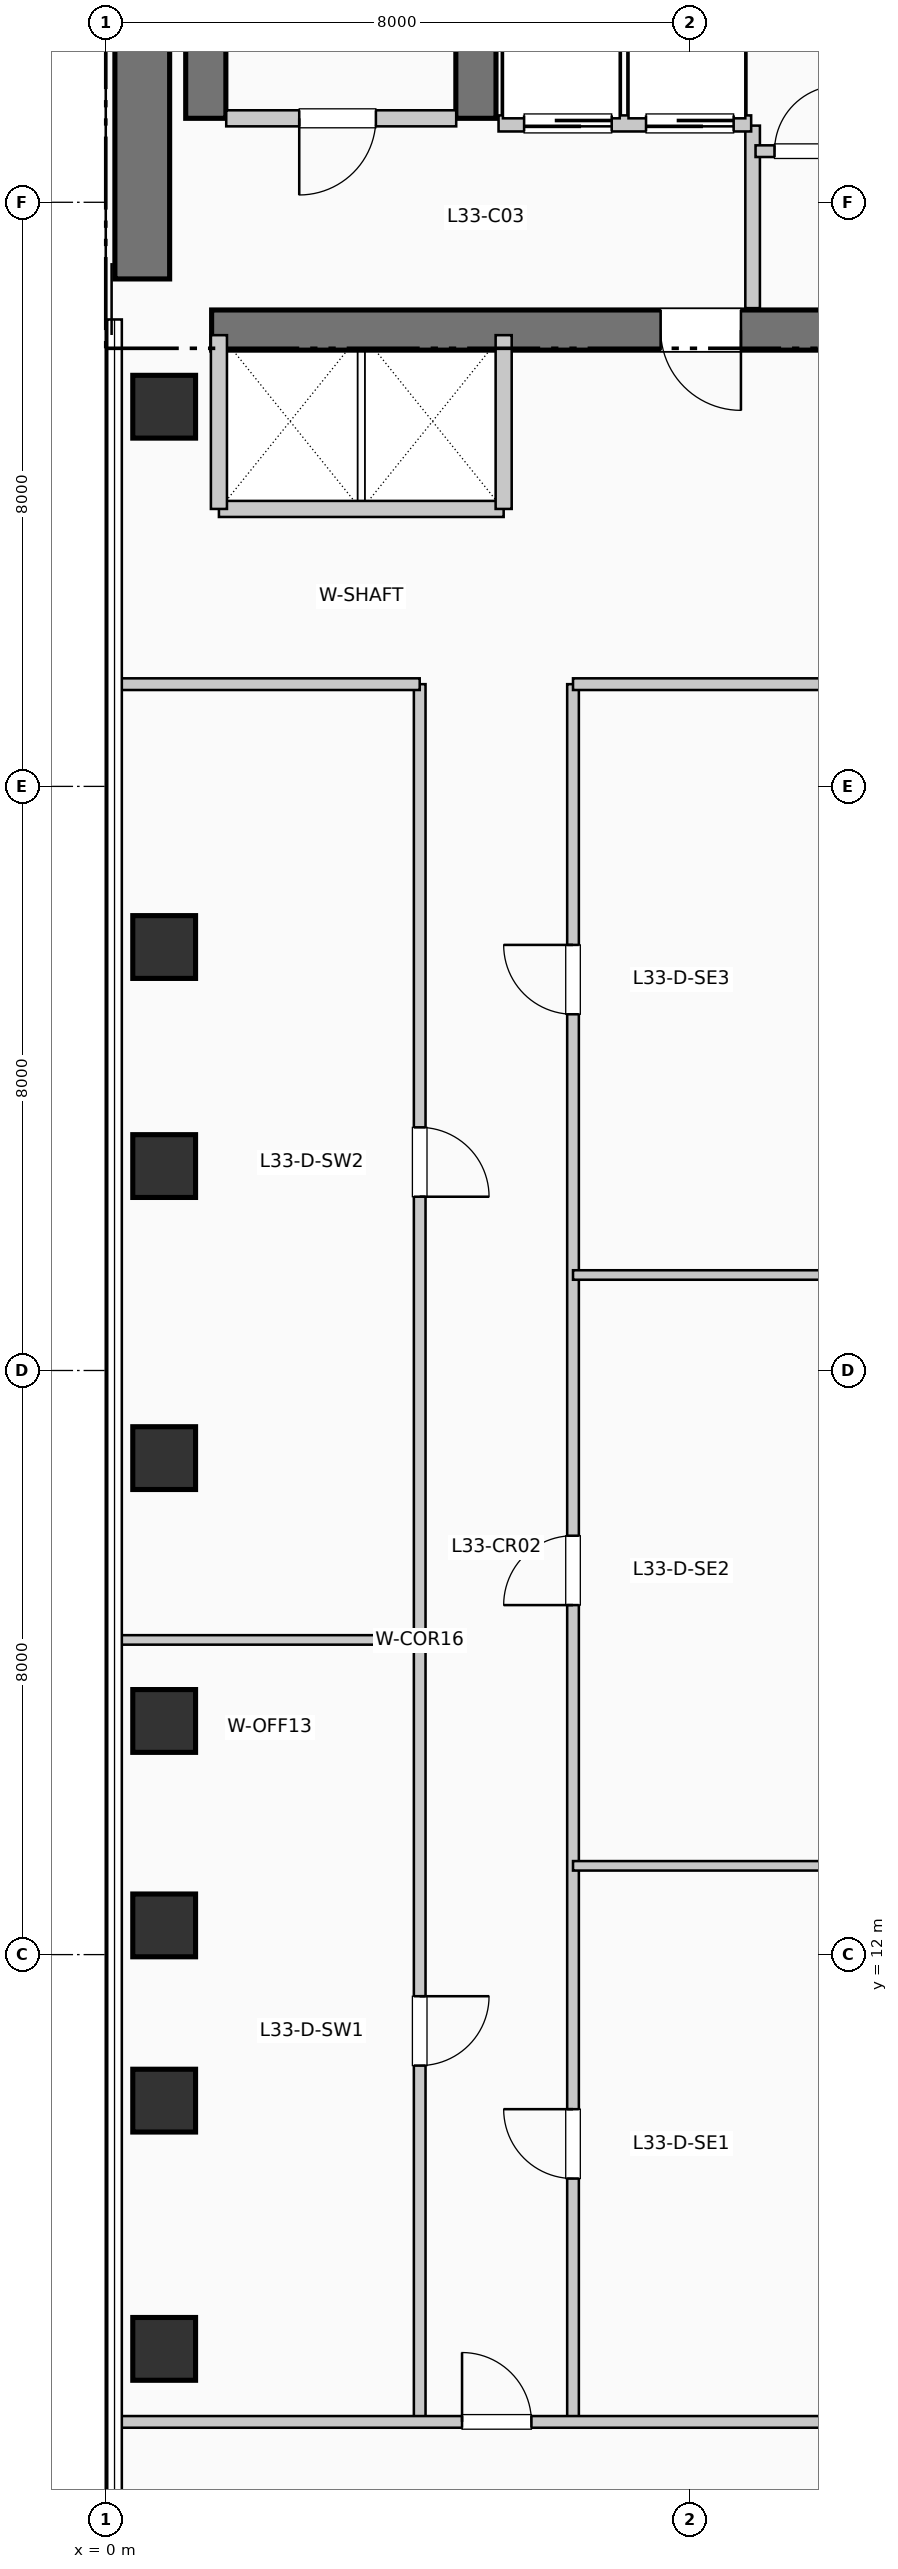
"""IFC4 building model, lengths in metres.
Left out: names, types, materials, properties, quantities, classifications, styles, units other than length and angle.
Written with IfcOpenShell. Run it as: python <this file> out.ifc"""

import sys

from ifc_helpers import new_model, si_unit, direction, frame, frame_2d, origin, origin_2d, place, context, subcontext, project, spatial, rectangle, extrude, element, fill, save


model = new_model("IFC4")
c1 = context("Model", 3, precision=1e-05, world=origin(), true_north=direction((0.0, 1.0)))
c2 = subcontext(c1, "Body", "Model", "MODEL_VIEW")
j1 = project(units=[si_unit("LENGTHUNIT", "METRE"), si_unit("PLANEANGLEUNIT", "RADIAN")], contexts=[c1])
p1 = place(None, origin())
s1 = spatial("IfcSite", under=j1, at=p1, CompositionType="ELEMENT")
p2 = place(p1, origin())
s2 = spatial("IfcBuilding", under=s1, at=p2, CompositionType="ELEMENT")
p3 = place(p2, frame((0.0, 0.0, 138.93)))
s3 = spatial("IfcBuildingStorey", under=s2, at=p3, CompositionType="ELEMENT", Elevation=138.93)
p4 = place(p3, frame((0.5, 34.95, 0.0), z_axis=(0.0, 0.0, 1.0), x_axis=(0.0, 1.0, 0.0)))
e1 = element("IfcWall", 1, at=p4, inside=s3, PredefinedType="SHEAR", context=c2, shape_type="SweptSolid", body=[
    extrude(rectangle(XDim=7.9, YDim=0.75, at=frame_2d((3.95, 0.0))), origin(), (0.0, 0.0, 1.0), 3.96),
])
p5 = place(p3, frame((1.45, 34.25, 0.0), z_axis=(0.0, 0.0, 1.0), x_axis=(1.0, 0.0, 0.0)))
e2 = element("IfcWall", 2, at=p5, inside=s3, PredefinedType="SHEAR", context=c2, shape_type="SweptSolid", body=[
    extrude(rectangle(XDim=10.71, YDim=0.55, at=frame_2d((5.355, 0.0))), origin(), (0.0, 0.0, 1.0), 3.96),
])
p6 = place(p5, frame((7.25, 0.0, 0.0), z_axis=(0.0, 0.0, 1.0), x_axis=(-1.0, 0.0, 0.0)))
e3 = element("IfcOpeningElement", 3, at=p6, cuts=e2, PredefinedType="OPENING", context=c2, shape_type="SweptSolid", body=[
    extrude(rectangle(XDim=1.1, YDim=2.15, at=frame_2d((0.55, 1.075))), frame((0.0, 0.285, 0.0), z_axis=(0.0, -1.0, 0.0), x_axis=(1.0, 0.0, 0.0)), (0.0, 0.0, 1.0), 0.57),
])
for number, where, z_axis, x_axis in (
    (4, (1.37, 37.15, 0.0), (0.0, 0.0, 1.0), (0.0, 1.0, 0.0)),
    (5, (5.07, 37.15, 0.0), (0.0, 0.0, 1.0), (0.0, 1.0, 0.0)),
):
    element("IfcWall", number, at=place(p3, frame(where, z_axis=z_axis, x_axis=x_axis)), inside=s3, PredefinedType="SHEAR", context=c2, shape_type="SweptSolid", body=[
        extrude(rectangle(XDim=7.89, YDim=0.55, at=frame_2d((3.945, 0.0))), origin(), (0.0, 0.0, 1.0), 3.96),
    ])
for number, where, z_axis, x_axis in (
    (6, (0.8, 6.6, 0.0), (0.0, 0.0, 1.0), (1.0, 0.0, 0.0)),
    (7, (0.8, 10.0, 0.0), (0.0, 0.0, 1.0), (1.0, 0.0, 0.0)),
    (8, (0.8, 12.4, 0.0), (0.0, 0.0, 1.0), (1.0, 0.0, 0.0)),
    (9, (0.8, 15.2, 0.0), (0.0, 0.0, 1.0), (1.0, 0.0, 0.0)),
    (10, (0.8, 18.8, 0.0), (0.0, 0.0, 1.0), (1.0, 0.0, 0.0)),
    (11, (0.8, 22.8, 0.0), (0.0, 0.0, 1.0), (1.0, 0.0, 0.0)),
    (12, (0.8, 25.8, 0.0), (0.0, 0.0, 1.0), (1.0, 0.0, 0.0)),
    (13, (0.8, 33.2, 0.0), (0.0, 0.0, 1.0), (1.0, 0.0, 0.0)),
):
    element("IfcColumn", number, at=place(p3, frame(where, z_axis=z_axis, x_axis=x_axis)), inside=s3, PredefinedType="COLUMN", context=c2, shape_type="SweptSolid", body=[
        extrude(rectangle(XDim=0.86, YDim=0.86, at=origin_2d()), origin(), (0.0, 0.0, 1.0), 3.96),
    ])
p7 = place(p3, frame((1.65, 37.15, 0.0), z_axis=(0.0, 0.0, 1.0), x_axis=(1.0, 0.0, 0.0)))
e14 = element("IfcWall", 14, at=p7, inside=s3, PredefinedType="PARTITIONING", context=c2, shape_type="SweptSolid", body=[
    extrude(rectangle(XDim=3.15, YDim=0.22, at=frame_2d((1.575, 0.0))), origin(), (0.0, 0.0, 1.0), 3.71),
])
p8 = place(p7, frame((2.05, 0.0, 0.0), z_axis=(0.0, 0.0, 1.0), x_axis=(-1.0, 0.0, 0.0)))
e15 = element("IfcOpeningElement", 15, at=p8, cuts=e14, PredefinedType="OPENING", context=c2, shape_type="SweptSolid", body=[
    extrude(rectangle(XDim=1.05, YDim=2.15, at=frame_2d((0.525, 1.075))), frame((0.0, 0.12, 0.0), z_axis=(0.0, -1.0, 0.0), x_axis=(1.0, 0.0, 0.0)), (0.0, 0.0, 1.0), 0.24),
])
p9 = place(p3, frame((8.86, 34.55, 0.0), z_axis=(0.0, 0.0, 1.0), x_axis=(0.0, 1.0, 0.0)))
e16 = element("IfcWall", 16, at=p9, inside=s3, PredefinedType="PARTITIONING", context=c2, shape_type="SweptSolid", body=[
    extrude(rectangle(XDim=2.5, YDim=0.2, at=frame_2d((1.25, 0.0))), origin(), (0.0, 0.0, 1.0), 3.71),
])
p10 = place(p3, frame((5.38, 37.08, 0.0), z_axis=(0.0, 0.0, 1.0), x_axis=(1.0, 0.0, 0.0)))
e17 = element("IfcWall", 17, at=p10, inside=s3, PredefinedType="PARTITIONING", context=c2, shape_type="SweptSolid", body=[
    extrude(rectangle(XDim=3.46, YDim=0.22, at=frame_2d((1.73, 0.0))), origin(), (0.0, 0.0, 1.0), 3.71),
])
p11 = place(p10, frame((1.55, 0.0, 0.0), z_axis=(0.0, 0.0, 1.0), x_axis=(-1.0, 0.0, 0.0)))
e18 = element("IfcOpeningElement", 18, at=p11, cuts=e17, PredefinedType="OPENING", context=c2, shape_type="SweptSolid", body=[
    extrude(rectangle(XDim=1.2, YDim=2.2, at=frame_2d((0.6, 1.1))), frame((0.0, 0.12, 0.0), z_axis=(0.0, -1.0, 0.0), x_axis=(1.0, 0.0, 0.0)), (0.0, 0.0, 1.0), 0.24),
])
p12 = place(p10, frame((3.22, 0.0, 0.0), z_axis=(0.0, 0.0, 1.0), x_axis=(-1.0, 0.0, 0.0)))
e19 = element("IfcOpeningElement", 19, at=p12, cuts=e17, PredefinedType="OPENING", context=c2, shape_type="SweptSolid", body=[
    extrude(rectangle(XDim=1.2, YDim=2.2, at=frame_2d((0.6, 1.1))), frame((0.0, 0.12, 0.0), z_axis=(0.0, -1.0, 0.0), x_axis=(1.0, 0.0, 0.0)), (0.0, 0.0, 1.0), 0.24),
])
p13 = place(p3, frame((1.55, 31.8, 0.0), z_axis=(0.0, 0.0, 1.0), x_axis=(1.0, 0.0, 0.0)))
e20 = element("IfcWall", 20, at=p13, inside=s3, PredefinedType="PARTITIONING", context=c2, shape_type="SweptSolid", body=[
    extrude(rectangle(XDim=3.9, YDim=0.22, at=frame_2d((1.95, 0.0))), origin(), (0.0, 0.0, 1.0), 3.71),
])
for number, where, z_axis, x_axis in (
    (21, (1.55, 31.8, 0.0), (0.0, 0.0, 1.0), (0.0, 1.0, 0.0)),
    (22, (5.45, 31.8, 0.0), (0.0, 0.0, 1.0), (0.0, 1.0, 0.0)),
):
    element("IfcWall", number, at=place(p3, frame(where, z_axis=z_axis, x_axis=x_axis)), inside=s3, PredefinedType="PARTITIONING", context=c2, shape_type="SweptSolid", body=[
        extrude(rectangle(XDim=2.38, YDim=0.22, at=frame_2d((1.19, 0.0))), origin(), (0.0, 0.0, 1.0), 3.71),
    ])
p14 = place(p3, frame((8.9, 36.7, 0.0), z_axis=(0.0, 0.0, 1.0), x_axis=(1.0, 0.0, 0.0)))
e23 = element("IfcWall", 23, at=p14, inside=s3, PredefinedType="PARTITIONING", context=c2, shape_type="SweptSolid", body=[
    extrude(rectangle(XDim=3.25, YDim=0.16, at=frame_2d((1.625, 0.0))), origin(), (0.0, 0.0, 1.0), 3.71),
])
p15 = place(p14, frame((0.26, 0.0, 0.0)))
e24 = element("IfcOpeningElement", 24, at=p15, cuts=e23, PredefinedType="OPENING", context=c2, shape_type="SweptSolid", body=[
    extrude(rectangle(XDim=0.9, YDim=2.15, at=frame_2d((0.45, 1.075))), frame((0.0, 0.09, 0.0), z_axis=(0.0, -1.0, 0.0), x_axis=(1.0, 0.0, 0.0)), (0.0, 0.0, 1.0), 0.18),
])
p16 = place(p14, frame((1.68, 0.0, 0.0)))
e25 = element("IfcOpeningElement", 25, at=p16, cuts=e23, PredefinedType="OPENING", context=c2, shape_type="SweptSolid", body=[
    extrude(rectangle(XDim=0.9, YDim=2.15, at=frame_2d((0.45, 1.075))), frame((0.0, 0.09, 0.0), z_axis=(0.0, -1.0, 0.0), x_axis=(1.0, 0.0, 0.0)), (0.0, 0.0, 1.0), 0.18),
])
p17 = place(p3, frame((4.3, 5.6, 0.0), z_axis=(0.0, 0.0, 1.0), x_axis=(0.0, 1.0, 0.0)))
e26 = element("IfcWall", 26, at=p17, inside=s3, PredefinedType="PARTITIONING", context=c2, shape_type="SweptSolid", body=[
    extrude(rectangle(XDim=23.8, YDim=0.16, at=frame_2d((11.9, 0.0))), origin(), (0.0, 0.0, 1.0), 3.71),
])
p18 = place(p17, frame((5.83, 0.0, 0.0), z_axis=(0.0, 0.0, 1.0), x_axis=(-1.0, 0.0, 0.0)))
e27 = element("IfcOpeningElement", 27, at=p18, cuts=e26, PredefinedType="OPENING", context=c2, shape_type="SweptSolid", body=[
    extrude(rectangle(XDim=0.95, YDim=2.15, at=frame_2d((0.475, 1.075))), frame((0.0, 0.09, 0.0), z_axis=(0.0, -1.0, 0.0), x_axis=(1.0, 0.0, 0.0)), (0.0, 0.0, 1.0), 0.18),
])
p19 = place(p17, frame((17.73, 0.0, 0.0), z_axis=(0.0, 0.0, 1.0), x_axis=(-1.0, 0.0, 0.0)))
e28 = element("IfcOpeningElement", 28, at=p19, cuts=e26, PredefinedType="OPENING", context=c2, shape_type="SweptSolid", body=[
    extrude(rectangle(XDim=0.95, YDim=2.15, at=frame_2d((0.475, 1.075))), frame((0.0, 0.09, 0.0), z_axis=(0.0, -1.0, 0.0), x_axis=(1.0, 0.0, 0.0)), (0.0, 0.0, 1.0), 0.18),
])
p20 = place(p3, frame((6.4, 5.6, 0.0), z_axis=(0.0, 0.0, 1.0), x_axis=(0.0, 1.0, 0.0)))
e29 = element("IfcWall", 29, at=p20, inside=s3, PredefinedType="PARTITIONING", context=c2, shape_type="SweptSolid", body=[
    extrude(rectangle(XDim=23.8, YDim=0.16, at=frame_2d((11.9, 0.0))), origin(), (0.0, 0.0, 1.0), 3.71),
])
p21 = place(p20, frame((3.333, 0.0, 0.0)))
e30 = element("IfcOpeningElement", 30, at=p21, cuts=e29, PredefinedType="OPENING", context=c2, shape_type="SweptSolid", body=[
    extrude(rectangle(XDim=0.95, YDim=2.15, at=frame_2d((0.475, 1.075))), frame((0.0, 0.09, 0.0), z_axis=(0.0, -1.0, 0.0), x_axis=(1.0, 0.0, 0.0)), (0.0, 0.0, 1.0), 0.18),
])
p22 = place(p20, frame((11.187, 0.0, 0.0)))
e31 = element("IfcOpeningElement", 31, at=p22, cuts=e29, PredefinedType="OPENING", context=c2, shape_type="SweptSolid", body=[
    extrude(rectangle(XDim=0.95, YDim=2.15, at=frame_2d((0.475, 1.075))), frame((0.0, 0.09, 0.0), z_axis=(0.0, -1.0, 0.0), x_axis=(1.0, 0.0, 0.0)), (0.0, 0.0, 1.0), 0.18),
])
p23 = place(p20, frame((19.279, 0.0, 0.0)))
e32 = element("IfcOpeningElement", 32, at=p23, cuts=e29, PredefinedType="OPENING", context=c2, shape_type="SweptSolid", body=[
    extrude(rectangle(XDim=0.95, YDim=2.15, at=frame_2d((0.475, 1.075))), frame((0.0, 0.09, 0.0), z_axis=(0.0, -1.0, 0.0), x_axis=(1.0, 0.0, 0.0)), (0.0, 0.0, 1.0), 0.18),
])
p24 = place(p3, frame((0.19, 5.6, 0.0), z_axis=(0.0, 0.0, 1.0), x_axis=(1.0, 0.0, 0.0)))
e33 = element("IfcWall", 33, at=p24, inside=s3, PredefinedType="PARTITIONING", context=c2, shape_type="SweptSolid", body=[
    extrude(rectangle(XDim=23.26, YDim=0.16, at=frame_2d((11.63, 0.0))), origin(), (0.0, 0.0, 1.0), 3.71),
])
p25 = place(p24, frame((4.69, 0.0, 0.0)))
e34 = element("IfcOpeningElement", 34, at=p25, cuts=e33, PredefinedType="OPENING", context=c2, shape_type="SweptSolid", body=[
    extrude(rectangle(XDim=0.95, YDim=2.15, at=frame_2d((0.475, 1.075))), frame((0.0, 0.09, 0.0), z_axis=(0.0, -1.0, 0.0), x_axis=(1.0, 0.0, 0.0)), (0.0, 0.0, 1.0), 0.18),
])
p26 = place(p3, frame((0.19, 29.4, 0.0), z_axis=(0.0, 0.0, 1.0), x_axis=(1.0, 0.0, 0.0)))
e35 = element("IfcWall", 35, at=p26, inside=s3, PredefinedType="PARTITIONING", context=c2, shape_type="SweptSolid", body=[
    extrude(rectangle(XDim=4.11, YDim=0.16, at=frame_2d((2.055, 0.0))), origin(), (0.0, 0.0, 1.0), 3.365),
])
p27 = place(p3, frame((6.4, 29.4, 0.0), z_axis=(0.0, 0.0, 1.0), x_axis=(1.0, 0.0, 0.0)))
e36 = element("IfcWall", 36, at=p27, inside=s3, PredefinedType="PARTITIONING", context=c2, shape_type="SweptSolid", body=[
    extrude(rectangle(XDim=17.05, YDim=0.16, at=frame_2d((8.525, 0.0))), origin(), (0.0, 0.0, 1.0), 3.365),
])
p28 = place(p3, frame((0.19, 16.31, 0.0), z_axis=(0.0, 0.0, 1.0), x_axis=(1.0, 0.0, 0.0)))
e37 = element("IfcWall", 37, at=p28, inside=s3, PredefinedType="PARTITIONING", context=c2, shape_type="SweptSolid", body=[
    extrude(rectangle(XDim=4.11, YDim=0.13, at=frame_2d((2.055, 0.0))), origin(), (0.0, 0.0, 1.0), 3.71),
])
for number, where, z_axis, x_axis in (
    (38, (6.4, 13.216, 0.0), (0.0, 0.0, 1.0), (1.0, 0.0, 0.0)),
    (39, (6.4, 21.308, 0.0), (0.0, 0.0, 1.0), (1.0, 0.0, 0.0)),
):
    element("IfcWall", number, at=place(p3, frame(where, z_axis=z_axis, x_axis=x_axis)), inside=s3, PredefinedType="PARTITIONING", context=c2, shape_type="SweptSolid", body=[
        extrude(rectangle(XDim=17.05, YDim=0.13, at=frame_2d((8.525, 0.0))), origin(), (0.0, 0.0, 1.0), 3.71),
    ])
p29 = place(p8, origin())
e40 = element("IfcDoor", 40, at=p29, inside=s3, OperationType="SINGLE_SWING_LEFT", PredefinedType="DOOR", context=c2, shape_type="SweptSolid", body=[
    extrude(rectangle(XDim=1.05, YDim=2.15, at=frame_2d((0.525, 1.075))), frame((0.0, 0.025, 0.0), z_axis=(0.0, -1.0, 0.0), x_axis=(1.0, 0.0, 0.0)), (0.0, 0.0, 1.0), 0.05),
])
fill(e15, e40)
p30 = place(p6, origin())
e41 = element("IfcDoor", 41, at=p30, inside=s3, OperationType="SINGLE_SWING_RIGHT", PredefinedType="DOOR", context=c2, shape_type="SweptSolid", body=[
    extrude(rectangle(XDim=1.1, YDim=2.15, at=frame_2d((0.55, 1.075))), frame((0.0, 0.025, 0.0), z_axis=(0.0, -1.0, 0.0), x_axis=(1.0, 0.0, 0.0)), (0.0, 0.0, 1.0), 0.05),
])
fill(e3, e41)
p31 = place(p11, origin())
e42 = element("IfcDoor", 42, at=p31, inside=s3, OperationType="SLIDING_TO_RIGHT", PredefinedType="DOOR", context=c2, shape_type="SweptSolid", body=[
    extrude(rectangle(XDim=1.2, YDim=2.2, at=frame_2d((0.6, 1.1))), frame((0.0, 0.025, 0.0), z_axis=(0.0, -1.0, 0.0), x_axis=(1.0, 0.0, 0.0)), (0.0, 0.0, 1.0), 0.05),
])
fill(e18, e42)
p32 = place(p12, origin())
e43 = element("IfcDoor", 43, at=p32, inside=s3, OperationType="SLIDING_TO_RIGHT", PredefinedType="DOOR", context=c2, shape_type="SweptSolid", body=[
    extrude(rectangle(XDim=1.2, YDim=2.2, at=frame_2d((0.6, 1.1))), frame((0.0, 0.025, 0.0), z_axis=(0.0, -1.0, 0.0), x_axis=(1.0, 0.0, 0.0)), (0.0, 0.0, 1.0), 0.05),
])
fill(e19, e43)
p33 = place(p15, origin())
e44 = element("IfcDoor", 44, at=p33, inside=s3, OperationType="SINGLE_SWING_RIGHT", PredefinedType="DOOR", context=c2, shape_type="SweptSolid", body=[
    extrude(rectangle(XDim=0.9, YDim=2.15, at=frame_2d((0.45, 1.075))), frame((0.0, 0.025, 0.0), z_axis=(0.0, -1.0, 0.0), x_axis=(1.0, 0.0, 0.0)), (0.0, 0.0, 1.0), 0.05),
])
fill(e24, e44)
p34 = place(p25, origin())
e45 = element("IfcDoor", 45, at=p34, inside=s3, OperationType="SINGLE_SWING_LEFT", PredefinedType="DOOR", context=c2, shape_type="SweptSolid", body=[
    extrude(rectangle(XDim=0.95, YDim=2.15, at=frame_2d((0.475, 1.075))), frame((0.0, 0.025, 0.0), z_axis=(0.0, -1.0, 0.0), x_axis=(1.0, 0.0, 0.0)), (0.0, 0.0, 1.0), 0.05),
])
fill(e34, e45)
p35 = place(p18, origin())
e46 = element("IfcDoor", 46, at=p35, inside=s3, OperationType="SINGLE_SWING_RIGHT", PredefinedType="DOOR", context=c2, shape_type="SweptSolid", body=[
    extrude(rectangle(XDim=0.95, YDim=2.15, at=frame_2d((0.475, 1.075))), frame((0.0, 0.025, 0.0), z_axis=(0.0, -1.0, 0.0), x_axis=(1.0, 0.0, 0.0)), (0.0, 0.0, 1.0), 0.05),
])
fill(e27, e46)
p36 = place(p19, origin())
e47 = element("IfcDoor", 47, at=p36, inside=s3, OperationType="SINGLE_SWING_LEFT", PredefinedType="DOOR", context=c2, shape_type="SweptSolid", body=[
    extrude(rectangle(XDim=0.95, YDim=2.15, at=frame_2d((0.475, 1.075))), frame((0.0, 0.025, 0.0), z_axis=(0.0, -1.0, 0.0), x_axis=(1.0, 0.0, 0.0)), (0.0, 0.0, 1.0), 0.05),
])
fill(e28, e47)
p37 = place(p21, origin())
e48 = element("IfcDoor", 48, at=p37, inside=s3, OperationType="SINGLE_SWING_RIGHT", PredefinedType="DOOR", context=c2, shape_type="SweptSolid", body=[
    extrude(rectangle(XDim=0.95, YDim=2.15, at=frame_2d((0.475, 1.075))), frame((0.0, 0.025, 0.0), z_axis=(0.0, -1.0, 0.0), x_axis=(1.0, 0.0, 0.0)), (0.0, 0.0, 1.0), 0.05),
])
fill(e30, e48)
p38 = place(p22, origin())
e49 = element("IfcDoor", 49, at=p38, inside=s3, OperationType="SINGLE_SWING_LEFT", PredefinedType="DOOR", context=c2, shape_type="SweptSolid", body=[
    extrude(rectangle(XDim=0.95, YDim=2.15, at=frame_2d((0.475, 1.075))), frame((0.0, 0.025, 0.0), z_axis=(0.0, -1.0, 0.0), x_axis=(1.0, 0.0, 0.0)), (0.0, 0.0, 1.0), 0.05),
])
fill(e31, e49)
p39 = place(p23, origin())
e50 = element("IfcDoor", 50, at=p39, inside=s3, OperationType="SINGLE_SWING_RIGHT", PredefinedType="DOOR", context=c2, shape_type="SweptSolid", body=[
    extrude(rectangle(XDim=0.95, YDim=2.15, at=frame_2d((0.475, 1.075))), frame((0.0, 0.025, 0.0), z_axis=(0.0, -1.0, 0.0), x_axis=(1.0, 0.0, 0.0)), (0.0, 0.0, 1.0), 0.05),
])
fill(e32, e50)
save(model, sys.argv[1])
